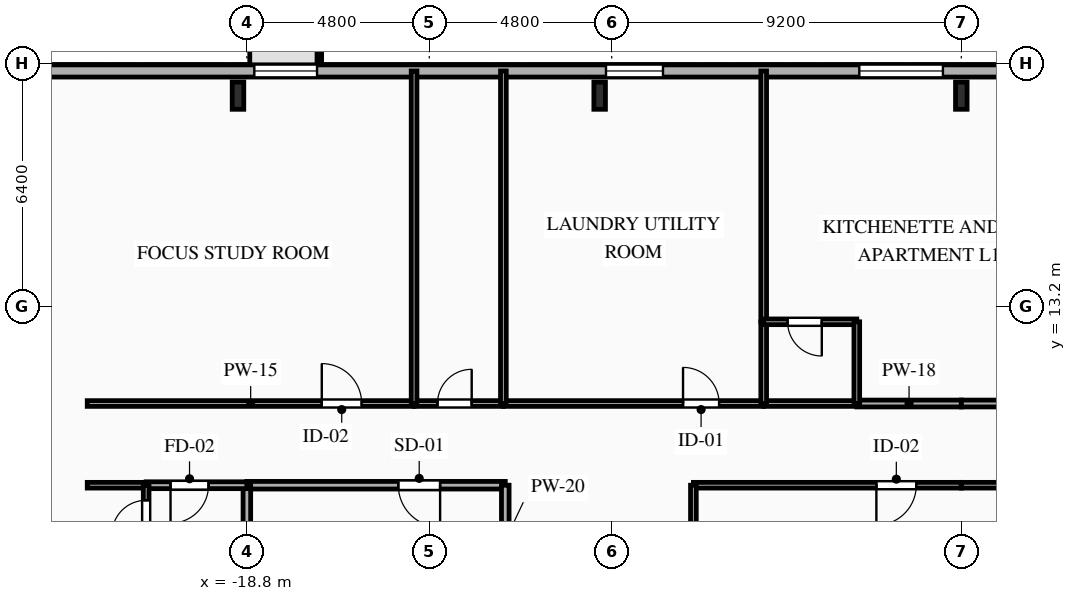
"""IFC4 building model, lengths in metres.
Left out: names, types, materials, properties, quantities, classifications, styles, units other than length and angle.
Written with IfcOpenShell. Run it as: python <this file> out.ifc"""

import sys

from ifc_helpers import new_model, si_unit, direction, frame, frame_2d, origin, origin_2d, place, context, subcontext, project, spatial, rectangle, i_section, extrude, element, fill, save


model = new_model("IFC4")
c1 = context("Model", 3, precision=1e-05, world=origin(), true_north=direction((0.0, 1.0)))
c2 = subcontext(c1, "Body", "Model", "MODEL_VIEW")
j1 = project(units=[si_unit("LENGTHUNIT", "METRE"), si_unit("PLANEANGLEUNIT", "RADIAN")], contexts=[c1])
p1 = place(None, origin())
s1 = spatial("IfcSite", under=j1, at=p1, CompositionType="ELEMENT")
p2 = place(p1, origin())
s2 = spatial("IfcBuilding", under=s1, at=p2, CompositionType="ELEMENT")
p3 = place(p2, frame((0.0, 0.0, 40.4)))
s3 = spatial("IfcBuildingStorey", under=s2, at=p3, CompositionType="ELEMENT", Elevation=40.4)
for number, where, z_axis, x_axis in (
    (1, (0.0, 18.75, 0.0), (0.0, 0.0, 1.0), (1.0, 0.0, 0.0)),
    (2, (-9.517, 18.75, 0.0), (0.0, 0.0, 1.0), (1.0, 0.0, 0.0)),
    (3, (-19.033, 18.75, 0.0), (0.0, 0.0, 1.0), (1.0, 0.0, 0.0)),
):
    element("IfcColumn", number, at=place(p3, frame(where, z_axis=z_axis, x_axis=x_axis)), inside=s3, PredefinedType="COLUMN", context=c2, shape_type="SweptSolid", body=[
        extrude(i_section(OverallWidth=0.304, OverallDepth=0.716, WebThickness=0.021, FlangeThickness=0.04, FilletRadius=0.027, at=origin_2d()), origin(), (0.0, 0.0, 1.0), 3.35),
    ])
p4 = place(p3, frame((-29.2, 19.4, 0.0), z_axis=(0.0, 0.0, 1.0), x_axis=(1.0, 0.0, 0.0)))
e4 = element("IfcWall", 4, at=p4, inside=s3, PredefinedType="SOLIDWALL", context=c2, shape_type="SweptSolid", body=[
    extrude(rectangle(XDim=58.4, YDim=0.32, at=frame_2d((29.2, 0.0))), origin(), (0.0, 0.0, 1.0), 3.035),
])
p5 = place(p4, frame((10.596, 0.0, 0.85)))
e5 = element("IfcOpeningElement", 5, at=p5, cuts=e4, PredefinedType="OPENING", context=c2, shape_type="SweptSolid", body=[
    extrude(rectangle(XDim=1.65, YDim=1.85, at=frame_2d((0.825, 0.925))), frame((0.0, 0.17, 0.0), z_axis=(0.0, -1.0, 0.0), x_axis=(1.0, 0.0, 0.0)), (0.0, 0.0, 1.0), 0.34),
])
p6 = place(p4, frame((19.85, 0.0, 0.85)))
e6 = element("IfcOpeningElement", 6, at=p6, cuts=e4, PredefinedType="OPENING", context=c2, shape_type="SweptSolid", body=[
    extrude(rectangle(XDim=1.5, YDim=1.85, at=frame_2d((0.75, 0.925))), frame((0.0, 0.17, 0.0), z_axis=(0.0, -1.0, 0.0), x_axis=(1.0, 0.0, 0.0)), (0.0, 0.0, 1.0), 0.34),
])
p7 = place(p4, frame((26.516, 0.0, 0.85)))
e7 = element("IfcOpeningElement", 7, at=p7, cuts=e4, PredefinedType="OPENING", context=c2, shape_type="SweptSolid", body=[
    extrude(rectangle(XDim=2.2, YDim=1.85, at=frame_2d((1.1, 0.925))), frame((0.0, 0.17, 0.0), z_axis=(0.0, -1.0, 0.0), x_axis=(1.0, 0.0, 0.0)), (0.0, 0.0, 1.0), 0.34),
])
p8 = place(p4, frame((35.716, 0.0, 0.85)))
e8 = element("IfcOpeningElement", 8, at=p8, cuts=e4, PredefinedType="OPENING", context=c2, shape_type="SweptSolid", body=[
    extrude(rectangle(XDim=2.2, YDim=1.85, at=frame_2d((1.1, 0.925))), frame((0.0, 0.17, 0.0), z_axis=(0.0, -1.0, 0.0), x_axis=(1.0, 0.0, 0.0)), (0.0, 0.0, 1.0), 0.34),
])
p9 = place(p4, frame((44.095, 0.0, 0.85)))
e9 = element("IfcOpeningElement", 9, at=p9, cuts=e4, PredefinedType="OPENING", context=c2, shape_type="SweptSolid", body=[
    extrude(rectangle(XDim=1.65, YDim=1.85, at=frame_2d((0.825, 0.925))), frame((0.0, 0.17, 0.0), z_axis=(0.0, -1.0, 0.0), x_axis=(1.0, 0.0, 0.0)), (0.0, 0.0, 1.0), 0.34),
])
p10 = place(p4, frame((48.975, 0.0, 0.85)))
e10 = element("IfcOpeningElement", 10, at=p10, cuts=e4, PredefinedType="OPENING", context=c2, shape_type="SweptSolid", body=[
    extrude(rectangle(XDim=1.65, YDim=1.85, at=frame_2d((0.825, 0.925))), frame((0.0, 0.17, 0.0), z_axis=(0.0, -1.0, 0.0), x_axis=(1.0, 0.0, 0.0)), (0.0, 0.0, 1.0), 0.34),
])
p11 = place(p4, frame((52.82, 0.0, 0.85)))
e11 = element("IfcOpeningElement", 11, at=p11, cuts=e4, PredefinedType="OPENING", context=c2, shape_type="SweptSolid", body=[
    extrude(rectangle(XDim=1.4, YDim=1.85, at=frame_2d((0.7, 0.925))), frame((0.0, 0.17, 0.0), z_axis=(0.0, -1.0, 0.0), x_axis=(1.0, 0.0, 0.0)), (0.0, 0.0, 1.0), 0.34),
])
p12 = place(p4, frame((55.575, 0.0, 0.85)))
e12 = element("IfcOpeningElement", 12, at=p12, cuts=e4, PredefinedType="OPENING", context=c2, shape_type="SweptSolid", body=[
    extrude(rectangle(XDim=1.65, YDim=1.85, at=frame_2d((0.825, 0.925))), frame((0.0, 0.17, 0.0), z_axis=(0.0, -1.0, 0.0), x_axis=(1.0, 0.0, 0.0)), (0.0, 0.0, 1.0), 0.34),
])
p13 = place(p3, frame((-12.0, 8.5, 0.0), z_axis=(0.0, 0.0, 1.0), x_axis=(-1.0, 0.0, 0.0)))
e13 = element("IfcWall", 13, at=p13, inside=s3, PredefinedType="PARTITIONING", context=c2, shape_type="SweptSolid", body=[
    extrude(rectangle(XDim=6.8, YDim=0.2, at=frame_2d((3.4, 0.0))), origin(), (0.0, 0.0, 1.0), 3.035),
])
p14 = place(p13, frame((1.715, 0.0, 0.0)))
e14 = element("IfcOpeningElement", 14, at=p14, cuts=e13, PredefinedType="OPENING", context=c2, shape_type="SweptSolid", body=[
    extrude(rectangle(XDim=1.1, YDim=2.15, at=frame_2d((0.55, 1.075))), frame((0.0, 0.11, 0.0), z_axis=(0.0, -1.0, 0.0), x_axis=(1.0, 0.0, 0.0)), (0.0, 0.0, 1.0), 0.22),
])
p15 = place(p3, frame((-12.0, 5.6, 0.0), z_axis=(0.0, 0.0, 1.0), x_axis=(0.0, 1.0, 0.0)))
e15 = element("IfcWall", 15, at=p15, inside=s3, PredefinedType="PARTITIONING", context=c2, shape_type="SweptSolid", body=[
    extrude(rectangle(XDim=2.9, YDim=0.2, at=frame_2d((1.45, 0.0))), origin(), (0.0, 0.0, 1.0), 3.035),
])
p16 = place(p3, frame((-18.8, 8.5, 0.0), z_axis=(0.0, 0.0, 1.0), x_axis=(0.0, -1.0, 0.0)))
e16 = element("IfcWall", 16, at=p16, inside=s3, PredefinedType="PARTITIONING", context=c2, shape_type="SweptSolid", body=[
    extrude(rectangle(XDim=2.9, YDim=0.2, at=frame_2d((1.45, 0.0))), origin(), (0.0, 0.0, 1.0), 2.52),
])
p17 = place(p3, frame((-18.8, 8.5, 0.0), z_axis=(0.0, 0.0, 1.0), x_axis=(-1.0, 0.0, 0.0)))
e17 = element("IfcWall", 17, at=p17, inside=s3, PredefinedType="PARTITIONING", context=c2, shape_type="SweptSolid", body=[
    extrude(rectangle(XDim=2.65, YDim=0.18, at=frame_2d((1.325, 0.0))), origin(), (0.0, 0.0, 1.0), 3.035),
])
p18 = place(p17, frame((1.009, 0.0, 0.0)))
e18 = element("IfcOpeningElement", 18, at=p18, cuts=e17, PredefinedType="OPENING", context=c2, shape_type="SweptSolid", body=[
    extrude(rectangle(XDim=1.0, YDim=2.15, at=frame_2d((0.5, 1.075))), frame((0.0, 0.1, 0.0), z_axis=(0.0, -1.0, 0.0), x_axis=(1.0, 0.0, 0.0)), (0.0, 0.0, 1.0), 0.2),
])
p19 = place(p3, frame((-21.45, 8.5, 0.0), z_axis=(0.0, 0.0, 1.0), x_axis=(-1.0, 0.0, 0.0)))
e19 = element("IfcWall", 19, at=p19, inside=s3, PredefinedType="PARTITIONING", context=c2, shape_type="SweptSolid", body=[
    extrude(rectangle(XDim=1.55, YDim=0.15, at=frame_2d((0.775, 0.0))), origin(), (0.0, 0.0, 1.0), 3.035),
])
p20 = place(p3, frame((-23.0, 10.65, 0.0), z_axis=(0.0, 0.0, 1.0), x_axis=(1.0, 0.0, 0.0)))
e20 = element("IfcWall", 20, at=p20, inside=s3, PredefinedType="PARTITIONING", context=c2, shape_type="SweptSolid", body=[
    extrude(rectangle(XDim=8.6, YDim=0.15, at=frame_2d((4.3, 0.0))), origin(), (0.0, 0.0, 1.0), 3.035),
])
p21 = place(p20, frame((6.171, 0.0, 0.0)))
e21 = element("IfcOpeningElement", 21, at=p21, cuts=e20, PredefinedType="OPENING", context=c2, shape_type="SweptSolid", body=[
    extrude(rectangle(XDim=1.05, YDim=2.15, at=frame_2d((0.525, 1.075))), frame((0.0, 0.085, 0.0), z_axis=(0.0, -1.0, 0.0), x_axis=(1.0, 0.0, 0.0)), (0.0, 0.0, 1.0), 0.17),
])
p22 = place(p3, frame((-14.4, 10.65, 0.0), z_axis=(0.0, 0.0, 1.0), x_axis=(1.0, 0.0, 0.0)))
e22 = element("IfcWall", 22, at=p22, inside=s3, PredefinedType="PLUMBINGWALL", context=c2, shape_type="SweptSolid", body=[
    extrude(rectangle(XDim=2.35, YDim=0.15, at=frame_2d((1.175, 0.0))), origin(), (0.0, 0.0, 1.0), 3.035),
])
p23 = place(p22, frame((0.616, 0.0, 0.0)))
e23 = element("IfcOpeningElement", 23, at=p23, cuts=e22, PredefinedType="OPENING", context=c2, shape_type="SweptSolid", body=[
    extrude(rectangle(XDim=0.9, YDim=2.1, at=frame_2d((0.45, 1.05))), frame((0.0, 0.085, 0.0), z_axis=(0.0, -1.0, 0.0), x_axis=(1.0, 0.0, 0.0)), (0.0, 0.0, 1.0), 0.17),
])
p24 = place(p3, frame((-12.05, 10.65, 0.0), z_axis=(0.0, 0.0, 1.0), x_axis=(1.0, 0.0, 0.0)))
e24 = element("IfcWall", 24, at=p24, inside=s3, PredefinedType="PARTITIONING", context=c2, shape_type="SweptSolid", body=[
    extrude(rectangle(XDim=6.85, YDim=0.15, at=frame_2d((3.425, 0.0))), origin(), (0.0, 0.0, 1.0), 3.035),
])
p25 = place(p24, frame((4.728, 0.0, 0.0)))
e25 = element("IfcOpeningElement", 25, at=p25, cuts=e24, PredefinedType="OPENING", context=c2, shape_type="SweptSolid", body=[
    extrude(rectangle(XDim=0.95, YDim=2.1, at=frame_2d((0.475, 1.05))), frame((0.0, 0.085, 0.0), z_axis=(0.0, -1.0, 0.0), x_axis=(1.0, 0.0, 0.0)), (0.0, 0.0, 1.0), 0.17),
])
p26 = place(p3, frame((-2.75, 10.65, 0.0), z_axis=(0.0, 0.0, 1.0), x_axis=(1.0, 0.0, 0.0)))
e26 = element("IfcWall", 26, at=p26, inside=s3, PredefinedType="PARTITIONING", context=c2, shape_type="SweptSolid", body=[
    extrude(rectangle(XDim=2.75, YDim=0.18, at=frame_2d((1.375, 0.0))), origin(), (0.0, 0.0, 1.0), 3.035),
])
p27 = place(p3, frame((-5.2, 10.65, 0.0), z_axis=(0.0, 0.0, 1.0), x_axis=(1.0, 0.0, 0.0)))
e27 = element("IfcWall", 27, at=p27, inside=s3, PredefinedType="PLUMBINGWALL", context=c2, shape_type="SweptSolid", body=[
    extrude(rectangle(XDim=2.45, YDim=0.15, at=frame_2d((1.225, 0.0))), origin(), (0.0, 0.0, 1.0), 3.035),
])
p28 = place(p3, frame((0.0, 8.5, 0.0), z_axis=(0.0, 0.0, 1.0), x_axis=(-1.0, 0.0, 0.0)))
e28 = element("IfcWall", 28, at=p28, inside=s3, PredefinedType="PARTITIONING", context=c2, shape_type="SweptSolid", body=[
    extrude(rectangle(XDim=7.05, YDim=0.15, at=frame_2d((3.525, 0.0))), origin(), (0.0, 0.0, 1.0), 3.035),
])
p29 = place(p28, frame((1.185, 0.0, 0.0)))
e29 = element("IfcOpeningElement", 29, at=p29, cuts=e28, PredefinedType="OPENING", context=c2, shape_type="SweptSolid", body=[
    extrude(rectangle(XDim=1.05, YDim=2.15, at=frame_2d((0.525, 1.075))), frame((0.0, 0.085, 0.0), z_axis=(0.0, -1.0, 0.0), x_axis=(1.0, 0.0, 0.0)), (0.0, 0.0, 1.0), 0.17),
])
p30 = place(p3, frame((0.0, 10.65, 0.0), z_axis=(0.0, 0.0, 1.0), x_axis=(1.0, 0.0, 0.0)))
e30 = element("IfcWall", 30, at=p30, inside=s3, PredefinedType="PARTITIONING", context=c2, shape_type="SweptSolid", body=[
    extrude(rectangle(XDim=4.0, YDim=0.18, at=frame_2d((2.0, 0.0))), origin(), (0.0, 0.0, 1.0), 3.035),
])
p31 = place(p30, frame((1.5, 0.0, 0.0)))
e31 = element("IfcOpeningElement", 31, at=p31, cuts=e30, PredefinedType="OPENING", context=c2, shape_type="SweptSolid", body=[
    extrude(rectangle(XDim=1.0, YDim=2.15, at=frame_2d((0.5, 1.075))), frame((0.0, 0.1, 0.0), z_axis=(0.0, -1.0, 0.0), x_axis=(1.0, 0.0, 0.0)), (0.0, 0.0, 1.0), 0.2),
])
for number, where, z_axis, x_axis in (
    (32, (7.05, 8.5, 0.0), (0.0, 0.0, 1.0), (-1.0, 0.0, 0.0)),
    (33, (-7.05, 8.5, 0.0), (0.0, 0.0, 1.0), (0.0, -1.0, 0.0)),
):
    element("IfcWall", number, at=place(p3, frame(where, z_axis=z_axis, x_axis=x_axis)), inside=s3, PredefinedType="PARTITIONING", context=c2, shape_type="SweptSolid", body=[
        extrude(rectangle(XDim=7.05, YDim=0.15, at=frame_2d((3.525, 0.0))), origin(), (0.0, 0.0, 1.0), 3.035),
    ])
p32 = place(p3, frame((-21.45, 6.808, 0.0), z_axis=(0.0, 0.0, 1.0), x_axis=(0.0, 1.0, 0.0)))
e34 = element("IfcWall", 34, at=p32, inside=s3, PredefinedType="PARTITIONING", context=c2, shape_type="SweptSolid", body=[
    extrude(rectangle(XDim=1.692, YDim=0.15, at=frame_2d((0.846, 0.0))), origin(), (0.0, 0.0, 1.0), 3.035),
])
p33 = place(p32, frame((0.396, 0.0, 0.0)))
e35 = element("IfcOpeningElement", 35, at=p33, cuts=e34, PredefinedType="OPENING", context=c2, shape_type="SweptSolid", body=[
    extrude(rectangle(XDim=0.9, YDim=2.1, at=frame_2d((0.45, 1.05))), frame((0.0, 0.085, 0.0), z_axis=(0.0, -1.0, 0.0), x_axis=(1.0, 0.0, 0.0)), (0.0, 0.0, 1.0), 0.17),
])
for number, where, z_axis, x_axis in (
    (36, (-14.4, 19.4, 0.0), (0.0, 0.0, 1.0), (0.0, -1.0, 0.0)),
    (37, (-12.05, 19.4, 0.0), (0.0, 0.0, 1.0), (0.0, -1.0, 0.0)),
):
    element("IfcWall", number, at=place(p3, frame(where, z_axis=z_axis, x_axis=x_axis)), inside=s3, PredefinedType="PLUMBINGWALL", context=c2, shape_type="SweptSolid", body=[
        extrude(rectangle(XDim=8.75, YDim=0.15, at=frame_2d((4.375, 0.0))), origin(), (0.0, 0.0, 1.0), 3.035),
    ])
p34 = place(p3, frame((-5.2, 19.4, 0.0), z_axis=(0.0, 0.0, 1.0), x_axis=(0.0, -1.0, 0.0)))
e38 = element("IfcWall", 38, at=p34, inside=s3, PredefinedType="PARTITIONING", context=c2, shape_type="SweptSolid", body=[
    extrude(rectangle(XDim=6.6, YDim=0.15, at=frame_2d((3.3, 0.0))), origin(), (0.0, 0.0, 1.0), 3.035),
])
p35 = place(p3, frame((-5.2, 12.8, 0.0), z_axis=(0.0, 0.0, 1.0), x_axis=(0.0, -1.0, 0.0)))
e39 = element("IfcWall", 39, at=p35, inside=s3, PredefinedType="PLUMBINGWALL", context=c2, shape_type="SweptSolid", body=[
    extrude(rectangle(XDim=2.15, YDim=0.15, at=frame_2d((1.075, 0.0))), origin(), (0.0, 0.0, 1.0), 3.035),
])
p36 = place(p3, frame((-2.75, 12.8, 0.0), z_axis=(0.0, 0.0, 1.0), x_axis=(-1.0, 0.0, 0.0)))
e40 = element("IfcWall", 40, at=p36, inside=s3, PredefinedType="PLUMBINGWALL", context=c2, shape_type="SweptSolid", body=[
    extrude(rectangle(XDim=2.45, YDim=0.15, at=frame_2d((1.225, 0.0))), origin(), (0.0, 0.0, 1.0), 3.035),
])
p37 = place(p36, frame((0.921, 0.0, 0.0)))
e41 = element("IfcOpeningElement", 41, at=p37, cuts=e40, PredefinedType="OPENING", context=c2, shape_type="SweptSolid", body=[
    extrude(rectangle(XDim=0.9, YDim=2.1, at=frame_2d((0.45, 1.05))), frame((0.0, 0.085, 0.0), z_axis=(0.0, -1.0, 0.0), x_axis=(1.0, 0.0, 0.0)), (0.0, 0.0, 1.0), 0.17),
])
p38 = place(p3, frame((-2.75, 10.65, 0.0), z_axis=(0.0, 0.0, 1.0), x_axis=(0.0, 1.0, 0.0)))
e42 = element("IfcWall", 42, at=p38, inside=s3, PredefinedType="PLUMBINGWALL", context=c2, shape_type="SweptSolid", body=[
    extrude(rectangle(XDim=2.15, YDim=0.15, at=frame_2d((1.075, 0.0))), origin(), (0.0, 0.0, 1.0), 3.035),
])
p39 = place(p5, origin())
e43 = element("IfcWindow", 43, at=p39, inside=s3, PartitioningType="SINGLE_PANEL", PredefinedType="WINDOW", context=c2, shape_type="SweptSolid", body=[
    extrude(rectangle(XDim=1.65, YDim=1.85, at=frame_2d((0.825, 0.925))), frame((0.0, 0.03, 0.0), z_axis=(0.0, -1.0, 0.0), x_axis=(1.0, 0.0, 0.0)), (0.0, 0.0, 1.0), 0.06),
])
fill(e5, e43)
p40 = place(p6, origin())
e44 = element("IfcWindow", 44, at=p40, inside=s3, PartitioningType="SINGLE_PANEL", PredefinedType="WINDOW", context=c2, shape_type="SweptSolid", body=[
    extrude(rectangle(XDim=1.5, YDim=1.85, at=frame_2d((0.75, 0.925))), frame((0.0, 0.03, 0.0), z_axis=(0.0, -1.0, 0.0), x_axis=(1.0, 0.0, 0.0)), (0.0, 0.0, 1.0), 0.06),
])
fill(e6, e44)
p41 = place(p7, origin())
e45 = element("IfcWindow", 45, at=p41, inside=s3, PartitioningType="SINGLE_PANEL", PredefinedType="WINDOW", context=c2, shape_type="SweptSolid", body=[
    extrude(rectangle(XDim=2.2, YDim=1.85, at=frame_2d((1.1, 0.925))), frame((0.0, 0.03, 0.0), z_axis=(0.0, -1.0, 0.0), x_axis=(1.0, 0.0, 0.0)), (0.0, 0.0, 1.0), 0.06),
])
fill(e7, e45)
p42 = place(p14, origin())
e46 = element("IfcDoor", 46, at=p42, inside=s3, OperationType="SINGLE_SWING_LEFT", PredefinedType="DOOR", context=c2, shape_type="SweptSolid", body=[
    extrude(rectangle(XDim=1.1, YDim=2.15, at=frame_2d((0.55, 1.075))), frame((0.0, 0.025, 0.0), z_axis=(0.0, -1.0, 0.0), x_axis=(1.0, 0.0, 0.0)), (0.0, 0.0, 1.0), 0.05),
])
fill(e14, e46)
p43 = place(p18, origin())
e47 = element("IfcDoor", 47, at=p43, inside=s3, OperationType="SINGLE_SWING_RIGHT", PredefinedType="DOOR", context=c2, shape_type="SweptSolid", body=[
    extrude(rectangle(XDim=1.0, YDim=2.15, at=frame_2d((0.5, 1.075))), frame((0.0, 0.025, 0.0), z_axis=(0.0, -1.0, 0.0), x_axis=(1.0, 0.0, 0.0)), (0.0, 0.0, 1.0), 0.05),
])
fill(e18, e47)
p44 = place(p21, origin())
e48 = element("IfcDoor", 48, at=p44, inside=s3, OperationType="SINGLE_SWING_LEFT", PredefinedType="DOOR", context=c2, shape_type="SweptSolid", body=[
    extrude(rectangle(XDim=1.05, YDim=2.15, at=frame_2d((0.525, 1.075))), frame((0.0, 0.025, 0.0), z_axis=(0.0, -1.0, 0.0), x_axis=(1.0, 0.0, 0.0)), (0.0, 0.0, 1.0), 0.05),
])
fill(e21, e48)
p45 = place(p23, origin())
e49 = element("IfcDoor", 49, at=p45, inside=s3, OperationType="SINGLE_SWING_RIGHT", PredefinedType="DOOR", context=c2, shape_type="SweptSolid", body=[
    extrude(rectangle(XDim=0.9, YDim=2.1, at=frame_2d((0.45, 1.05))), frame((0.0, 0.025, 0.0), z_axis=(0.0, -1.0, 0.0), x_axis=(1.0, 0.0, 0.0)), (0.0, 0.0, 1.0), 0.05),
])
fill(e23, e49)
p46 = place(p25, origin())
e50 = element("IfcDoor", 50, at=p46, inside=s3, OperationType="SINGLE_SWING_LEFT", PredefinedType="DOOR", context=c2, shape_type="SweptSolid", body=[
    extrude(rectangle(XDim=0.95, YDim=2.1, at=frame_2d((0.475, 1.05))), frame((0.0, 0.025, 0.0), z_axis=(0.0, -1.0, 0.0), x_axis=(1.0, 0.0, 0.0)), (0.0, 0.0, 1.0), 0.05),
])
fill(e25, e50)
p47 = place(p29, origin())
e51 = element("IfcDoor", 51, at=p47, inside=s3, OperationType="SINGLE_SWING_RIGHT", PredefinedType="DOOR", context=c2, shape_type="SweptSolid", body=[
    extrude(rectangle(XDim=1.05, YDim=2.15, at=frame_2d((0.525, 1.075))), frame((0.0, 0.025, 0.0), z_axis=(0.0, -1.0, 0.0), x_axis=(1.0, 0.0, 0.0)), (0.0, 0.0, 1.0), 0.05),
])
fill(e29, e51)
p48 = place(p33, origin())
e52 = element("IfcDoor", 52, at=p48, inside=s3, OperationType="SINGLE_SWING_LEFT", PredefinedType="DOOR", context=c2, shape_type="SweptSolid", body=[
    extrude(rectangle(XDim=0.9, YDim=2.1, at=frame_2d((0.45, 1.05))), frame((0.0, 0.025, 0.0), z_axis=(0.0, -1.0, 0.0), x_axis=(1.0, 0.0, 0.0)), (0.0, 0.0, 1.0), 0.05),
])
fill(e35, e52)
p49 = place(p37, origin())
e53 = element("IfcDoor", 53, at=p49, inside=s3, OperationType="SINGLE_SWING_LEFT", PredefinedType="DOOR", context=c2, shape_type="SweptSolid", body=[
    extrude(rectangle(XDim=0.9, YDim=2.1, at=frame_2d((0.45, 1.05))), frame((0.0, 0.025, 0.0), z_axis=(0.0, -1.0, 0.0), x_axis=(1.0, 0.0, 0.0)), (0.0, 0.0, 1.0), 0.05),
])
fill(e41, e53)
save(model, sys.argv[1])
